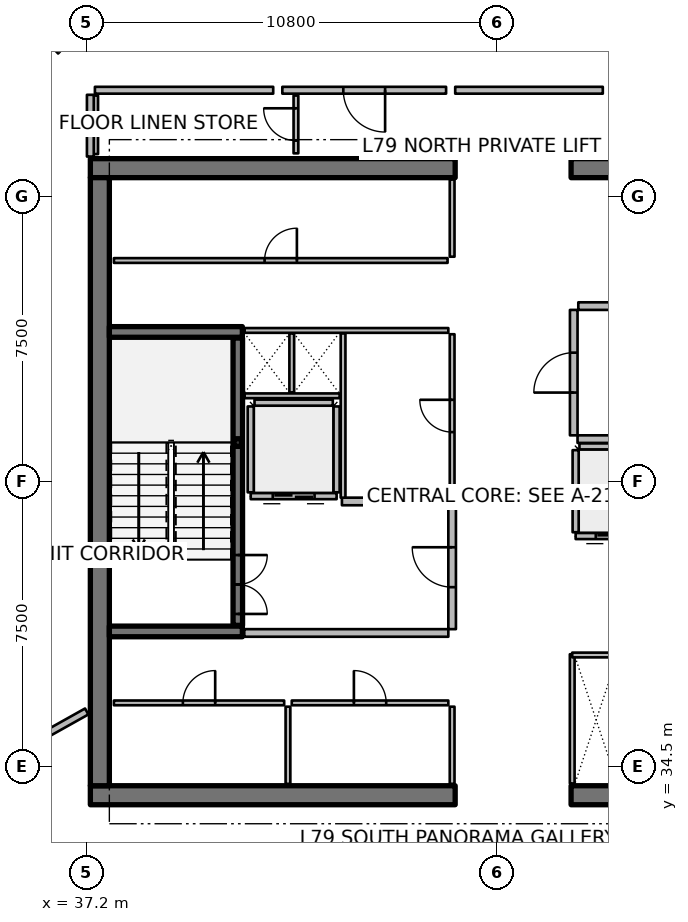
"""IFC4 building model, lengths in metres.
Left out: names, types, materials, properties, quantities, classifications, styles, units other than length and angle.
Written with IfcOpenShell. Run it as: python <this file> out.ifc"""

import sys

from ifc_helpers import new_model, si_unit, direction, frame, frame_2d, origin, origin_2d, place, context, subcontext, project, spatial, rectangle, hollow_rectangle, extrude, element, fill, save


model = new_model("IFC4")
c1 = context("Model", 3, precision=1e-05, world=origin(), true_north=direction((0.0, 1.0)))
c2 = subcontext(c1, "Body", "Model", "MODEL_VIEW")
j1 = project(units=[si_unit("LENGTHUNIT", "METRE"), si_unit("PLANEANGLEUNIT", "RADIAN")], contexts=[c1])
p1 = place(None, origin())
s1 = spatial("IfcSite", under=j1, at=p1, CompositionType="ELEMENT")
p2 = place(p1, origin())
s2 = spatial("IfcBuilding", under=s1, at=p2, CompositionType="ELEMENT")
p3 = place(p2, frame((0.0, 0.0, 313.7)))
s3 = spatial("IfcBuildingStorey", under=s2, at=p3, CompositionType="ELEMENT", Elevation=313.7)
p4 = place(p3, frame((37.3, 33.75, 0.0), z_axis=(0.0, 0.0, 1.0), x_axis=(1.0, 0.0, 0.0)))
e1 = element("IfcWall", 1, at=p4, inside=s3, PredefinedType="SHEAR", context=c2, shape_type="SweptSolid", body=[
    extrude(rectangle(XDim=9.6, YDim=0.5, at=frame_2d((4.8, 0.0))), origin(), (0.0, 0.0, 1.0), 4.2),
])
p5 = place(p3, frame((49.95, 33.75, 0.0), z_axis=(0.0, 0.0, 1.0), x_axis=(1.0, 0.0, 0.0)))
e2 = element("IfcWall", 2, at=p5, inside=s3, PredefinedType="SHEAR", context=c2, shape_type="SweptSolid", body=[
    extrude(rectangle(XDim=9.6, YDim=0.5, at=frame_2d((4.8, 0.0))), origin(), (0.0, 0.0, 1.0), 4.2),
])
p6 = place(p3, frame((37.3, 50.25, 0.0), z_axis=(0.0, 0.0, 1.0), x_axis=(1.0, 0.0, 0.0)))
e3 = element("IfcWall", 3, at=p6, inside=s3, PredefinedType="SHEAR", context=c2, shape_type="SweptSolid", body=[
    extrude(rectangle(XDim=9.6, YDim=0.5, at=frame_2d((4.8, 0.0))), origin(), (0.0, 0.0, 1.0), 4.2),
])
p7 = place(p3, frame((49.95, 50.25, 0.0), z_axis=(0.0, 0.0, 1.0), x_axis=(1.0, 0.0, 0.0)))
e4 = element("IfcWall", 4, at=p7, inside=s3, PredefinedType="SHEAR", context=c2, shape_type="SweptSolid", body=[
    extrude(rectangle(XDim=9.6, YDim=0.5, at=frame_2d((4.8, 0.0))), origin(), (0.0, 0.0, 1.0), 4.2),
])
p8 = place(p3, frame((37.55, 34.0, 0.0), z_axis=(0.0, 0.0, 1.0), x_axis=(0.0, 1.0, 0.0)))
e5 = element("IfcWall", 5, at=p8, inside=s3, PredefinedType="SHEAR", context=c2, shape_type="SweptSolid", body=[
    extrude(rectangle(XDim=16.0, YDim=0.5, at=frame_2d((8.0, 0.0))), origin(), (0.0, 0.0, 1.0), 4.2),
])
for number, where, z_axis, x_axis in (
    (6, (37.8, 38.06, 0.0), (0.0, 0.0, 1.0), (1.0, 0.0, 0.0)),
    (7, (37.8, 45.94, 0.0), (0.0, 0.0, 1.0), (1.0, 0.0, 0.0)),
):
    element("IfcWall", number, at=place(p3, frame(where, z_axis=z_axis, x_axis=x_axis)), inside=s3, PredefinedType="SHEAR", context=c2, shape_type="SweptSolid", body=[
        extrude(rectangle(XDim=3.5, YDim=0.28, at=frame_2d((1.75, 0.0))), origin(), (0.0, 0.0, 1.0), 4.2),
    ])
p9 = place(p3, frame((41.18, 43.03, 0.0), z_axis=(0.0, 0.0, 1.0), x_axis=(1.0, 0.0, 0.0)))
e8 = element("IfcColumn", 8, at=p9, inside=s3, PredefinedType="COLUMN", context=c2, shape_type="SweptSolid", body=[
    extrude(hollow_rectangle(XDim=0.2, YDim=0.2, WallThickness=0.01, InnerFilletRadius=0.01, OuterFilletRadius=0.02, at=origin_2d()), origin(), (0.0, 0.0, 1.0), 1.895),
])
p10 = place(p3, frame((41.18, 38.22, 0.0), z_axis=(0.0, 0.0, 1.0), x_axis=(0.0, 1.0, 0.0)))
e9 = element("IfcWall", 9, at=p10, inside=s3, PredefinedType="SOLIDWALL", context=c2, shape_type="SweptSolid", body=[
    extrude(rectangle(XDim=7.56, YDim=0.25, at=frame_2d((3.78, 0.0))), origin(), (0.0, 0.0, 1.0), 3.94),
])
p11 = place(p10, frame((0.3, 0.0, 0.0)))
e10 = element("IfcOpeningElement", 10, at=p11, cuts=e9, PredefinedType="OPENING", context=c2, shape_type="SweptSolid", body=[
    extrude(rectangle(XDim=1.55, YDim=2.15, at=frame_2d((0.775, 1.075))), frame((0.0, 0.135, 0.0), z_axis=(0.0, -1.0, 0.0), x_axis=(1.0, 0.0, 0.0)), (0.0, 0.0, 1.0), 0.27),
])
p12 = place(p3, frame((43.78, 41.62, 0.0), z_axis=(0.0, 0.0, 1.0), x_axis=(-1.0, 0.0, 0.0)))
e11 = element("IfcWall", 11, at=p12, inside=s3, PredefinedType="PARTITIONING", context=c2, shape_type="SweptSolid", body=[
    extrude(rectangle(XDim=2.26, YDim=0.16, at=frame_2d((1.13, 0.0))), origin(), (0.0, 0.0, 1.0), 3.94),
])
p13 = place(p12, frame((0.58, 0.0, 0.0)))
e12 = element("IfcOpeningElement", 12, at=p13, cuts=e11, PredefinedType="OPENING", context=c2, shape_type="SweptSolid", body=[
    extrude(rectangle(XDim=1.1, YDim=2.1, at=frame_2d((0.55, 1.05))), frame((0.0, 0.09, 0.0), z_axis=(0.0, -1.0, 0.0), x_axis=(1.0, 0.0, 0.0)), (0.0, 0.0, 1.0), 0.18),
])
for number, where, z_axis, x_axis in (
    (13, (43.78, 41.72, 0.0), (0.0, 0.0, 1.0), (0.0, 1.0, 0.0)),
    (14, (41.52, 41.72, 0.0), (0.0, 0.0, 1.0), (0.0, 1.0, 0.0)),
):
    element("IfcWall", number, at=place(p3, frame(where, z_axis=z_axis, x_axis=x_axis)), inside=s3, PredefinedType="PARTITIONING", context=c2, shape_type="SweptSolid", body=[
        extrude(rectangle(XDim=2.26, YDim=0.16, at=frame_2d((1.13, 0.0))), origin(), (0.0, 0.0, 1.0), 3.94),
    ])
p14 = place(p3, frame((41.62, 44.08, 0.0), z_axis=(0.0, 0.0, 1.0), x_axis=(1.0, 0.0, 0.0)))
e15 = element("IfcWall", 15, at=p14, inside=s3, PredefinedType="PARTITIONING", context=c2, shape_type="SweptSolid", body=[
    extrude(rectangle(XDim=2.06, YDim=0.16, at=frame_2d((1.03, 0.0))), origin(), (0.0, 0.0, 1.0), 3.94),
])
p15 = place(p3, frame((52.23, 40.57, 0.0), z_axis=(0.0, 0.0, 1.0), x_axis=(-1.0, 0.0, 0.0)))
e16 = element("IfcWall", 16, at=p15, inside=s3, PredefinedType="PARTITIONING", context=c2, shape_type="SweptSolid", body=[
    extrude(rectangle(XDim=2.16, YDim=0.16, at=frame_2d((1.08, 0.0))), origin(), (0.0, 0.0, 1.0), 3.94),
])
p16 = place(p15, frame((0.53, 0.0, 0.0)))
e17 = element("IfcOpeningElement", 17, at=p16, cuts=e16, PredefinedType="OPENING", context=c2, shape_type="SweptSolid", body=[
    extrude(rectangle(XDim=1.1, YDim=2.1, at=frame_2d((0.55, 1.05))), frame((0.0, 0.09, 0.0), z_axis=(0.0, -1.0, 0.0), x_axis=(1.0, 0.0, 0.0)), (0.0, 0.0, 1.0), 0.18),
])
p17 = place(p3, frame((50.07, 40.67, 0.0), z_axis=(0.0, 0.0, 1.0), x_axis=(0.0, 1.0, 0.0)))
e18 = element("IfcWall", 18, at=p17, inside=s3, PredefinedType="PARTITIONING", context=c2, shape_type="SweptSolid", body=[
    extrude(rectangle(XDim=2.16, YDim=0.16, at=frame_2d((1.08, 0.0))), origin(), (0.0, 0.0, 1.0), 3.94),
])
p18 = place(p3, frame((50.17, 42.93, 0.0), z_axis=(0.0, 0.0, 1.0), x_axis=(1.0, 0.0, 0.0)))
e19 = element("IfcWall", 19, at=p18, inside=s3, PredefinedType="PARTITIONING", context=c2, shape_type="SweptSolid", body=[
    extrude(rectangle(XDim=1.96, YDim=0.16, at=frame_2d((0.98, 0.0))), origin(), (0.0, 0.0, 1.0), 3.94),
])
for number, where, z_axis, x_axis in (
    (20, (46.82, 34.05, 0.0), (0.0, 0.0, 1.0), (0.0, 1.0, 0.0)),
    (21, (42.5, 34.05, 0.0), (0.0, 0.0, 1.0), (0.0, 1.0, 0.0)),
):
    element("IfcWall", number, at=place(p3, frame(where, z_axis=z_axis, x_axis=x_axis)), inside=s3, PredefinedType="PARTITIONING", context=c2, shape_type="SweptSolid", body=[
        extrude(rectangle(XDim=2.03, YDim=0.125, at=frame_2d((1.015, 0.0))), origin(), (0.0, 0.0, 1.0), 3.38),
    ])
p19 = place(p3, frame((37.92, 36.18, 0.0), z_axis=(0.0, 0.0, 1.0), x_axis=(1.0, 0.0, 0.0)))
e22 = element("IfcWall", 22, at=p19, inside=s3, PredefinedType="PARTITIONING", context=c2, shape_type="SweptSolid", body=[
    extrude(rectangle(XDim=4.48, YDim=0.125, at=frame_2d((2.24, 0.0))), origin(), (0.0, 0.0, 1.0), 3.38),
])
p20 = place(p19, frame((1.815, 0.0, 0.0)))
e23 = element("IfcOpeningElement", 23, at=p20, cuts=e22, PredefinedType="OPENING", context=c2, shape_type="SweptSolid", body=[
    extrude(rectangle(XDim=0.85, YDim=2.06, at=frame_2d((0.425, 1.03))), frame((0.0, 0.073, 0.0), z_axis=(0.0, -1.0, 0.0), x_axis=(1.0, 0.0, 0.0)), (0.0, 0.0, 1.0), 0.145),
])
p21 = place(p3, frame((42.6, 36.18, 0.0), z_axis=(0.0, 0.0, 1.0), x_axis=(1.0, 0.0, 0.0)))
e24 = element("IfcWall", 24, at=p21, inside=s3, PredefinedType="PARTITIONING", context=c2, shape_type="SweptSolid", body=[
    extrude(rectangle(XDim=4.12, YDim=0.125, at=frame_2d((2.06, 0.0))), origin(), (0.0, 0.0, 1.0), 3.38),
])
p22 = place(p21, frame((1.635, 0.0, 0.0)))
e25 = element("IfcOpeningElement", 25, at=p22, cuts=e24, PredefinedType="OPENING", context=c2, shape_type="SweptSolid", body=[
    extrude(rectangle(XDim=0.85, YDim=2.06, at=frame_2d((0.425, 1.03))), frame((0.0, 0.073, 0.0), z_axis=(0.0, -1.0, 0.0), x_axis=(1.0, 0.0, 0.0)), (0.0, 0.0, 1.0), 0.145),
])
p23 = place(p3, frame((46.82, 47.92, 0.0), z_axis=(0.0, 0.0, 1.0), x_axis=(0.0, 1.0, 0.0)))
e26 = element("IfcWall", 26, at=p23, inside=s3, PredefinedType="PARTITIONING", context=c2, shape_type="SweptSolid", body=[
    extrude(rectangle(XDim=2.03, YDim=0.125, at=frame_2d((1.015, 0.0))), origin(), (0.0, 0.0, 1.0), 3.38),
])
p24 = place(p3, frame((37.92, 47.82, 0.0), z_axis=(0.0, 0.0, 1.0), x_axis=(1.0, 0.0, 0.0)))
e27 = element("IfcWall", 27, at=p24, inside=s3, PredefinedType="PARTITIONING", context=c2, shape_type="SweptSolid", body=[
    extrude(rectangle(XDim=8.78, YDim=0.125, at=frame_2d((4.39, 0.0))), origin(), (0.0, 0.0, 1.0), 3.38),
])
p25 = place(p24, frame((3.965, 0.0, 0.0)))
e28 = element("IfcOpeningElement", 28, at=p25, cuts=e27, PredefinedType="OPENING", context=c2, shape_type="SweptSolid", body=[
    extrude(rectangle(XDim=0.85, YDim=2.06, at=frame_2d((0.425, 1.03))), frame((0.0, 0.073, 0.0), z_axis=(0.0, -1.0, 0.0), x_axis=(1.0, 0.0, 0.0)), (0.0, 0.0, 1.0), 0.145),
])
p26 = place(p3, frame((41.35, 38.02, 0.0), z_axis=(0.0, 0.0, 1.0), x_axis=(1.0, 0.0, 0.0)))
e29 = element("IfcWall", 29, at=p26, inside=s3, PredefinedType="PARTITIONING", context=c2, shape_type="SweptSolid", body=[
    extrude(rectangle(XDim=5.37, YDim=0.2, at=frame_2d((2.685, 0.0))), origin(), (0.0, 0.0, 1.0), 3.94),
])
p27 = place(p3, frame((43.92, 41.48, 0.0), z_axis=(0.0, 0.0, 1.0), x_axis=(1.0, 0.0, 0.0)))
e30 = element("IfcWall", 30, at=p27, inside=s3, PredefinedType="PARTITIONING", context=c2, shape_type="SweptSolid", body=[
    extrude(rectangle(XDim=2.8, YDim=0.2, at=frame_2d((1.4, 0.0))), origin(), (0.0, 0.0, 1.0), 3.94),
])
p28 = place(p3, frame((46.82, 38.12, 0.0), z_axis=(0.0, 0.0, 1.0), x_axis=(0.0, 1.0, 0.0)))
e31 = element("IfcWall", 31, at=p28, inside=s3, PredefinedType="PARTITIONING", context=c2, shape_type="SweptSolid", body=[
    extrude(rectangle(XDim=3.26, YDim=0.2, at=frame_2d((1.63, 0.0))), origin(), (0.0, 0.0, 1.0), 3.94),
])
p29 = place(p28, frame((1.105, 0.0, 0.0)))
e32 = element("IfcOpeningElement", 32, at=p29, cuts=e31, PredefinedType="OPENING", context=c2, shape_type="SweptSolid", body=[
    extrude(rectangle(XDim=1.05, YDim=2.1, at=frame_2d((0.525, 1.05))), frame((0.0, 0.11, 0.0), z_axis=(0.0, -1.0, 0.0), x_axis=(1.0, 0.0, 0.0)), (0.0, 0.0, 1.0), 0.22),
])
p30 = place(p3, frame((50.12, 43.12, 0.0), z_axis=(0.0, 0.0, 1.0), x_axis=(1.0, 0.0, 0.0)))
e33 = element("IfcWall", 33, at=p30, inside=s3, PredefinedType="PARTITIONING", context=c2, shape_type="SweptSolid", body=[
    extrude(rectangle(XDim=8.88, YDim=0.2, at=frame_2d((4.44, 0.0))), origin(), (0.0, 0.0, 1.0), 3.94),
])
p31 = place(p3, frame((50.14, 46.62, 0.0), z_axis=(0.0, 0.0, 1.0), x_axis=(1.0, 0.0, 0.0)))
e34 = element("IfcWall", 34, at=p31, inside=s3, PredefinedType="PARTITIONING", context=c2, shape_type="SweptSolid", body=[
    extrude(rectangle(XDim=1.02, YDim=0.2, at=frame_2d((0.51, 0.0))), origin(), (0.0, 0.0, 1.0), 3.94),
])
p32 = place(p3, frame((50.02, 43.22, 0.0), z_axis=(0.0, 0.0, 1.0), x_axis=(0.0, 1.0, 0.0)))
e35 = element("IfcWall", 35, at=p32, inside=s3, PredefinedType="PARTITIONING", context=c2, shape_type="SweptSolid", body=[
    extrude(rectangle(XDim=3.3, YDim=0.2, at=frame_2d((1.65, 0.0))), origin(), (0.0, 0.0, 1.0), 3.94),
])
p33 = place(p32, frame((1.125, 0.0, 0.0)))
e36 = element("IfcOpeningElement", 36, at=p33, cuts=e35, PredefinedType="OPENING", context=c2, shape_type="SweptSolid", body=[
    extrude(rectangle(XDim=1.05, YDim=2.1, at=frame_2d((0.525, 1.05))), frame((0.0, 0.11, 0.0), z_axis=(0.0, -1.0, 0.0), x_axis=(1.0, 0.0, 0.0)), (0.0, 0.0, 1.0), 0.22),
])
p34 = place(p3, frame((41.36, 45.98, 0.0), z_axis=(0.0, 0.0, 1.0), x_axis=(1.0, 0.0, 0.0)))
e37 = element("IfcWall", 37, at=p34, inside=s3, PredefinedType="PARTITIONING", context=c2, shape_type="SweptSolid", body=[
    extrude(rectangle(XDim=5.36, YDim=0.125, at=frame_2d((2.68, 0.0))), origin(), (0.0, 0.0, 1.0), 3.38),
])
p35 = place(p3, frame((41.36, 44.26, 0.0), z_axis=(0.0, 0.0, 1.0), x_axis=(1.0, 0.0, 0.0)))
e38 = element("IfcWall", 38, at=p35, inside=s3, PredefinedType="PARTITIONING", context=c2, shape_type="SweptSolid", body=[
    extrude(rectangle(XDim=2.5, YDim=0.125, at=frame_2d((1.25, 0.0))), origin(), (0.0, 0.0, 1.0), 3.38),
])
p36 = place(p3, frame((42.6, 44.35, 0.0), z_axis=(0.0, 0.0, 1.0), x_axis=(0.0, 1.0, 0.0)))
e39 = element("IfcWall", 39, at=p36, inside=s3, PredefinedType="PARTITIONING", context=c2, shape_type="SweptSolid", body=[
    extrude(rectangle(XDim=1.55, YDim=0.125, at=frame_2d((0.775, 0.0))), origin(), (0.0, 0.0, 1.0), 3.38),
])
p37 = place(p3, frame((49.98, 34.06, 0.0), z_axis=(0.0, 0.0, 1.0), x_axis=(0.0, 1.0, 0.0)))
e40 = element("IfcWall", 40, at=p37, inside=s3, PredefinedType="PARTITIONING", context=c2, shape_type="SweptSolid", body=[
    extrude(rectangle(XDim=3.4, YDim=0.125, at=frame_2d((1.7, 0.0))), origin(), (0.0, 0.0, 1.0), 3.38),
])
p38 = place(p3, frame((49.98, 37.44, 0.0), z_axis=(0.0, 0.0, 1.0), x_axis=(1.0, 0.0, 0.0)))
e41 = element("IfcWall", 41, at=p38, inside=s3, PredefinedType="PARTITIONING", context=c2, shape_type="SweptSolid", body=[
    extrude(rectangle(XDim=1.26, YDim=0.125, at=frame_2d((0.63, 0.0))), origin(), (0.0, 0.0, 1.0), 3.38),
])
p39 = place(p3, frame((43.95, 41.58, 0.0), z_axis=(0.0, 0.0, 1.0), x_axis=(0.0, 1.0, 0.0)))
e42 = element("IfcWall", 42, at=p39, inside=s3, PredefinedType="PARTITIONING", context=c2, shape_type="SweptSolid", body=[
    extrude(rectangle(XDim=4.32, YDim=0.125, at=frame_2d((2.16, 0.0))), origin(), (0.0, 0.0, 1.0), 3.38),
])
p40 = place(p3, frame((46.82, 41.58, 0.0), z_axis=(0.0, 0.0, 1.0), x_axis=(0.0, 1.0, 0.0)))
e43 = element("IfcWall", 43, at=p40, inside=s3, PredefinedType="PARTITIONING", context=c2, shape_type="SweptSolid", body=[
    extrude(rectangle(XDim=4.3, YDim=0.125, at=frame_2d((2.15, 0.0))), origin(), (0.0, 0.0, 1.0), 3.38),
])
p41 = place(p40, frame((1.725, 0.0, 0.0)))
e44 = element("IfcOpeningElement", 44, at=p41, cuts=e43, PredefinedType="OPENING", context=c2, shape_type="SweptSolid", body=[
    extrude(rectangle(XDim=0.85, YDim=2.06, at=frame_2d((0.425, 1.03))), frame((0.0, 0.073, 0.0), z_axis=(0.0, -1.0, 0.0), x_axis=(1.0, 0.0, 0.0)), (0.0, 0.0, 1.0), 0.145),
])
p42 = place(p3, frame((37.44, 50.62, 0.0), z_axis=(0.0, 0.0, 1.0), x_axis=(0.0, 1.0, 0.0)))
e45 = element("IfcWall", 45, at=p42, inside=s3, PredefinedType="PARTITIONING", context=c2, shape_type="SweptSolid", body=[
    extrude(rectangle(XDim=1.54, YDim=0.125, at=frame_2d((0.77, 0.0))), origin(), (0.0, 0.0, 1.0), 3.38),
])
p43 = place(p3, frame((42.71, 50.64, 0.0), z_axis=(0.0, 0.0, 1.0), x_axis=(0.0, 1.0, 0.0)))
e46 = element("IfcWall", 46, at=p43, inside=s3, PredefinedType="PARTITIONING", context=c2, shape_type="SweptSolid", body=[
    extrude(rectangle(XDim=1.52, YDim=0.125, at=frame_2d((0.76, 0.0))), origin(), (0.0, 0.0, 1.0), 3.38),
])
p44 = place(p43, frame((0.335, 0.0, 0.0)))
e47 = element("IfcOpeningElement", 47, at=p44, cuts=e46, PredefinedType="OPENING", context=c2, shape_type="SweptSolid", body=[
    extrude(rectangle(XDim=0.85, YDim=2.06, at=frame_2d((0.425, 1.03))), frame((0.0, 0.073, 0.0), z_axis=(0.0, -1.0, 0.0), x_axis=(1.0, 0.0, 0.0)), (0.0, 0.0, 1.0), 0.145),
])
p45 = place(p3, frame((37.204, 35.954, 0.0), z_axis=(0.0, 0.0, 1.0), x_axis=(-0.872495191914, -0.488622697064, 0.0)))
e48 = element("IfcWall", 48, at=p45, inside=s3, PredefinedType="PARTITIONING", context=c2, shape_type="SweptSolid", body=[
    extrude(rectangle(XDim=13.462, YDim=0.18, at=frame_2d((6.731, 0.0))), origin(), (0.0, 0.0, 1.0), 3.38),
])
p46 = place(p3, frame((46.661, 52.3, 0.0), z_axis=(0.0, 0.0, 1.0), x_axis=(-1.0, 0.0, 0.0)))
e49 = element("IfcWall", 49, at=p46, inside=s3, PredefinedType="PARTITIONING", context=c2, shape_type="SweptSolid", body=[
    extrude(rectangle(XDim=4.309, YDim=0.18, at=frame_2d((2.155, 0.0))), origin(), (0.0, 0.0, 1.0), 3.38),
])
p47 = place(p46, frame((1.604, 0.0, 0.0)))
e50 = element("IfcOpeningElement", 50, at=p47, cuts=e49, PredefinedType="OPENING", context=c2, shape_type="SweptSolid", body=[
    extrude(rectangle(XDim=1.1, YDim=2.1, at=frame_2d((0.55, 1.05))), frame((0.0, 0.1, 0.0), z_axis=(0.0, -1.0, 0.0), x_axis=(1.0, 0.0, 0.0)), (0.0, 0.0, 1.0), 0.2),
])
p48 = place(p3, frame((50.785, 52.3, 0.0), z_axis=(0.0, 0.0, 1.0), x_axis=(-1.0, 0.0, 0.0)))
e51 = element("IfcWall", 51, at=p48, inside=s3, PredefinedType="PARTITIONING", context=c2, shape_type="SweptSolid", body=[
    extrude(rectangle(XDim=3.884, YDim=0.18, at=frame_2d((1.942, 0.0))), origin(), (0.0, 0.0, 1.0), 3.38),
])
p49 = place(p3, frame((42.112, 52.3, 0.0), z_axis=(0.0, 0.0, 1.0), x_axis=(-1.0, 0.0, 0.0)))
e52 = element("IfcWall", 52, at=p49, inside=s3, PredefinedType="PARTITIONING", context=c2, shape_type="SweptSolid", body=[
    extrude(rectangle(XDim=4.692, YDim=0.18, at=frame_2d((2.346, 0.0))), origin(), (0.0, 0.0, 1.0), 3.38),
])
p50 = place(p3, frame((37.3, 52.18, 0.0), z_axis=(0.0, 0.0, 1.0), x_axis=(0.0, -1.0, 0.0)))
e53 = element("IfcWall", 53, at=p50, inside=s3, PredefinedType="PARTITIONING", context=c2, shape_type="SweptSolid", body=[
    extrude(rectangle(XDim=1.625, YDim=0.18, at=frame_2d((0.812, 0.0))), origin(), (0.0, 0.0, 1.0), 3.38),
])
p51 = place(p3, frame((37.728, 55.735, 0.0), z_axis=(0.0, 0.0, 1.0), x_axis=(-0.717843655189, -0.696204342636, 0.0)))
e54 = element("IfcWall", 54, at=p51, inside=s3, PredefinedType="PARTITIONING", context=c2, shape_type="SweptSolid", body=[
    extrude(rectangle(XDim=4.366, YDim=0.125, at=frame_2d((2.183, 0.0))), origin(), (0.0, 0.0, 1.0), 3.38),
])
p52 = place(p51, frame((1.733, 0.0, 0.0)))
e55 = element("IfcOpeningElement", 55, at=p52, cuts=e54, PredefinedType="OPENING", context=c2, shape_type="SweptSolid", body=[
    extrude(rectangle(XDim=0.9, YDim=2.08, at=frame_2d((0.45, 1.04))), frame((0.0, 0.073, 0.0), z_axis=(0.0, -1.0, 0.0), x_axis=(1.0, 0.0, 0.0)), (0.0, 0.0, 1.0), 0.145),
])
p53 = place(p11, origin())
e56 = element("IfcDoor", 56, at=p53, inside=s3, OperationType="DOUBLE_DOOR_SINGLE_SWING", PredefinedType="DOOR", context=c2, shape_type="SweptSolid", body=[
    extrude(rectangle(XDim=1.55, YDim=2.15, at=frame_2d((0.775, 1.075))), frame((0.0, 0.025, 0.0), z_axis=(0.0, -1.0, 0.0), x_axis=(1.0, 0.0, 0.0)), (0.0, 0.0, 1.0), 0.05),
])
fill(e10, e56)
p54 = place(p13, origin())
e57 = element("IfcDoor", 57, at=p54, inside=s3, OperationType="DOUBLE_DOOR_SLIDING", PredefinedType="DOOR", context=c2, shape_type="SweptSolid", body=[
    extrude(rectangle(XDim=1.1, YDim=2.1, at=frame_2d((0.55, 1.05))), frame((0.0, 0.025, 0.0), z_axis=(0.0, -1.0, 0.0), x_axis=(1.0, 0.0, 0.0)), (0.0, 0.0, 1.0), 0.05),
])
fill(e12, e57)
p55 = place(p16, origin())
e58 = element("IfcDoor", 58, at=p55, inside=s3, OperationType="DOUBLE_DOOR_SLIDING", PredefinedType="DOOR", context=c2, shape_type="SweptSolid", body=[
    extrude(rectangle(XDim=1.1, YDim=2.1, at=frame_2d((0.55, 1.05))), frame((0.0, 0.025, 0.0), z_axis=(0.0, -1.0, 0.0), x_axis=(1.0, 0.0, 0.0)), (0.0, 0.0, 1.0), 0.05),
])
fill(e17, e58)
p56 = place(p20, origin())
e59 = element("IfcDoor", 59, at=p56, inside=s3, OperationType="SINGLE_SWING_RIGHT", PredefinedType="DOOR", context=c2, shape_type="SweptSolid", body=[
    extrude(rectangle(XDim=0.85, YDim=2.06, at=frame_2d((0.425, 1.03))), frame((0.0, 0.025, 0.0), z_axis=(0.0, -1.0, 0.0), x_axis=(1.0, 0.0, 0.0)), (0.0, 0.0, 1.0), 0.05),
])
fill(e23, e59)
p57 = place(p22, origin())
e60 = element("IfcDoor", 60, at=p57, inside=s3, OperationType="SINGLE_SWING_LEFT", PredefinedType="DOOR", context=c2, shape_type="SweptSolid", body=[
    extrude(rectangle(XDim=0.85, YDim=2.06, at=frame_2d((0.425, 1.03))), frame((0.0, 0.025, 0.0), z_axis=(0.0, -1.0, 0.0), x_axis=(1.0, 0.0, 0.0)), (0.0, 0.0, 1.0), 0.05),
])
fill(e25, e60)
p58 = place(p25, origin())
e61 = element("IfcDoor", 61, at=p58, inside=s3, OperationType="SINGLE_SWING_RIGHT", PredefinedType="DOOR", context=c2, shape_type="SweptSolid", body=[
    extrude(rectangle(XDim=0.85, YDim=2.06, at=frame_2d((0.425, 1.03))), frame((0.0, 0.025, 0.0), z_axis=(0.0, -1.0, 0.0), x_axis=(1.0, 0.0, 0.0)), (0.0, 0.0, 1.0), 0.05),
])
fill(e28, e61)
p59 = place(p29, origin())
e62 = element("IfcDoor", 62, at=p59, inside=s3, OperationType="SINGLE_SWING_RIGHT", PredefinedType="DOOR", context=c2, shape_type="SweptSolid", body=[
    extrude(rectangle(XDim=1.05, YDim=2.1, at=frame_2d((0.525, 1.05))), frame((0.0, 0.025, 0.0), z_axis=(0.0, -1.0, 0.0), x_axis=(1.0, 0.0, 0.0)), (0.0, 0.0, 1.0), 0.05),
])
fill(e32, e62)
p60 = place(p33, origin())
e63 = element("IfcDoor", 63, at=p60, inside=s3, OperationType="SINGLE_SWING_LEFT", PredefinedType="DOOR", context=c2, shape_type="SweptSolid", body=[
    extrude(rectangle(XDim=1.05, YDim=2.1, at=frame_2d((0.525, 1.05))), frame((0.0, 0.025, 0.0), z_axis=(0.0, -1.0, 0.0), x_axis=(1.0, 0.0, 0.0)), (0.0, 0.0, 1.0), 0.05),
])
fill(e36, e63)
p61 = place(p41, origin())
e64 = element("IfcDoor", 64, at=p61, inside=s3, OperationType="SINGLE_SWING_RIGHT", PredefinedType="DOOR", context=c2, shape_type="SweptSolid", body=[
    extrude(rectangle(XDim=0.85, YDim=2.06, at=frame_2d((0.425, 1.03))), frame((0.0, 0.025, 0.0), z_axis=(0.0, -1.0, 0.0), x_axis=(1.0, 0.0, 0.0)), (0.0, 0.0, 1.0), 0.05),
])
fill(e44, e64)
p62 = place(p44, origin())
e65 = element("IfcDoor", 65, at=p62, inside=s3, OperationType="SINGLE_SWING_RIGHT", PredefinedType="DOOR", context=c2, shape_type="SweptSolid", body=[
    extrude(rectangle(XDim=0.85, YDim=2.06, at=frame_2d((0.425, 1.03))), frame((0.0, 0.025, 0.0), z_axis=(0.0, -1.0, 0.0), x_axis=(1.0, 0.0, 0.0)), (0.0, 0.0, 1.0), 0.05),
])
fill(e47, e65)
p63 = place(p47, origin())
e66 = element("IfcDoor", 66, at=p63, inside=s3, OperationType="SINGLE_SWING_LEFT", PredefinedType="DOOR", context=c2, shape_type="SweptSolid", body=[
    extrude(rectangle(XDim=1.1, YDim=2.1, at=frame_2d((0.55, 1.05))), frame((0.0, 0.025, 0.0), z_axis=(0.0, -1.0, 0.0), x_axis=(1.0, 0.0, 0.0)), (0.0, 0.0, 1.0), 0.05),
])
fill(e50, e66)
save(model, sys.argv[1])
